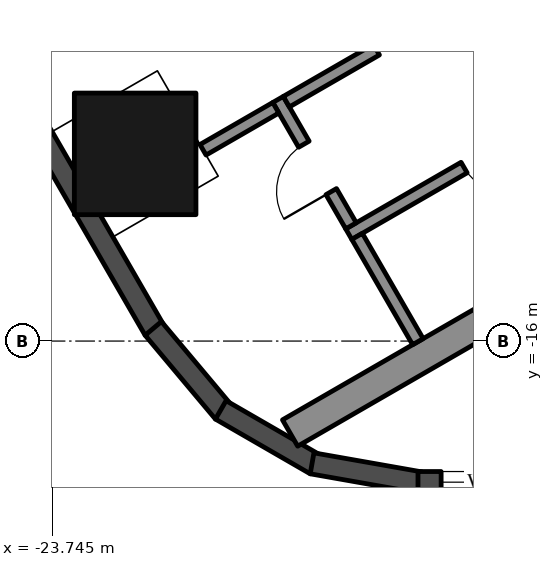
"""IFC4 building model, lengths in metres.
Left out: names, types, materials, properties, quantities, classifications, styles, units other than length and angle.
Written with IfcOpenShell. Run it as: python <this file> out.ifc"""

import sys

from ifc_helpers import new_model, si_unit, direction, frame, frame_2d, origin, origin_2d, place, context, subcontext, project, spatial, rectangle, hollow_rectangle, extrude, boolean, halfspace, element, fill, save


model = new_model("IFC4")
c1 = context("Model", 3, precision=1e-05, world=origin(), true_north=direction((0.0, 1.0)))
c2 = subcontext(c1, "Body", "Model", "MODEL_VIEW")
j1 = project(units=[si_unit("LENGTHUNIT", "METRE"), si_unit("PLANEANGLEUNIT", "RADIAN")], contexts=[c1])
p1 = place(None, origin())
s1 = spatial("IfcSite", under=j1, at=p1, CompositionType="ELEMENT")
p2 = place(p1, origin())
s2 = spatial("IfcBuilding", under=s1, at=p2, CompositionType="ELEMENT")
p3 = place(p2, frame((0.0, 0.0, 276.3)))
s3 = spatial("IfcBuildingStorey", under=s2, at=p3, CompositionType="ELEMENT", Elevation=276.3)
p4 = place(p3, frame((-22.38, -12.921, 0.0), z_axis=(0.190406849863, 0.109944185114, 0.975529347424), x_axis=(0.499999219142, -0.866025854536, 1.1512328e-05)))
e1 = element("IfcColumn", 1, at=p4, inside=s3, PredefinedType="COLUMN", context=c2, shape_type="SweptSolid", body=[
    boolean("DIFFERENCE", boolean("DIFFERENCE", extrude(hollow_rectangle(XDim=2.0, YDim=2.0, WallThickness=0.05, at=origin_2d()), origin(), (0.0, 0.0, 1.0), 3.793), halfspace(frame((0.0, 0.0, 0.113), z_axis=(0.0, 0.0, 1.0), x_axis=(1.0, 0.0, 0.0)), True)), halfspace(frame((0.0, 0.0, 3.679), z_axis=(0.0, 0.0, 1.0), x_axis=(1.0, 0.0, 0.0)), False)),
])
p5 = place(p3, frame((-24.731, -11.2, 0.0), z_axis=(0.0, 0.0, 1.0), x_axis=(0.500025039717, -0.866010946615, 0.0)))
e2 = element("IfcWall", 2, at=p5, inside=s3, PredefinedType="SOLIDWALL", context=c2, shape_type="SweptSolid", body=[
    extrude(rectangle(XDim=5.331, YDim=0.35, at=frame_2d((2.666, 0.0))), origin(), (0.0, 0.0, 1.0), 3.55),
])
p6 = place(p3, frame((-22.083, -15.792, 0.0), z_axis=(0.0, 0.0, 1.0), x_axis=(0.642756114672, -0.766070869471, 0.0)))
e3 = element("IfcWall", 3, at=p6, inside=s3, PredefinedType="SOLIDWALL", context=c2, shape_type="SweptSolid", body=[
    extrude(rectangle(XDim=1.8, YDim=0.35, at=frame_2d((0.9, 0.0))), origin(), (0.0, 0.0, 1.0), 3.55),
])
p7 = place(p3, frame((-20.972, -17.132, 0.0), z_axis=(0.0, 0.0, 1.0), x_axis=(0.866047807691, -0.499961193289, 0.0)))
e4 = element("IfcWall", 4, at=p7, inside=s3, PredefinedType="SOLIDWALL", context=c2, shape_type="SweptSolid", body=[
    extrude(rectangle(XDim=1.8, YDim=0.35, at=frame_2d((0.9, 0.0))), origin(), (0.0, 0.0, 1.0), 3.55),
])
p8 = place(p3, frame((-19.471, -18.011, 0.0), z_axis=(0.0, 0.0, 1.0), x_axis=(0.984810858511, -0.173630564586, 0.0)))
e5 = element("IfcWall", 5, at=p8, inside=s3, PredefinedType="SOLIDWALL", context=c2, shape_type="SweptSolid", body=[
    extrude(rectangle(XDim=1.8, YDim=0.35, at=frame_2d((0.9, 0.0))), origin(), (0.0, 0.0, 1.0), 3.55),
])
p9 = place(p3, frame((-17.729, -18.321, 0.0), z_axis=(0.0, 0.0, 1.0), x_axis=(1.0, 0.0, 0.0)))
e6 = element("IfcWall", 6, at=p9, inside=s3, PredefinedType="SOLIDWALL", context=c2, shape_type="SweptSolid", body=[
    extrude(rectangle(XDim=11.185, YDim=0.35, at=frame_2d((5.593, 0.0))), origin(), (0.0, 0.0, 1.0), 3.55),
])
p10 = place(p9, frame((0.381, 0.0, 0.3)))
e7 = element("IfcOpeningElement", 7, at=p10, cuts=e6, PredefinedType="OPENING", context=c2, shape_type="SweptSolid", body=[
    extrude(rectangle(XDim=1.7, YDim=2.65, at=frame_2d((0.85, 1.325))), frame((0.0, 0.185, 0.0), z_axis=(0.0, -1.0, 0.0), x_axis=(1.0, 0.0, 0.0)), (0.0, 0.0, 1.0), 0.37),
])
p11 = place(p9, frame((7.205, 0.0, 0.0)))
e8 = element("IfcOpeningElement", 8, at=p11, cuts=e6, PredefinedType="OPENING", context=c2, shape_type="SweptSolid", body=[
    extrude(rectangle(XDim=2.4, YDim=2.4, at=frame_2d((1.2, 1.2))), frame((0.0, 0.185, 0.0), z_axis=(0.0, -1.0, 0.0), x_axis=(1.0, 0.0, 0.0)), (0.0, 0.0, 1.0), 0.37),
])
p12 = place(p9, frame((3.979, 0.0, 0.3)))
e9 = element("IfcOpeningElement", 9, at=p12, cuts=e6, PredefinedType="OPENING", context=c2, shape_type="SweptSolid", body=[
    extrude(rectangle(XDim=2.9, YDim=2.65, at=frame_2d((1.45, 1.325))), frame((0.0, 0.185, 0.0), z_axis=(0.0, -1.0, 0.0), x_axis=(1.0, 0.0, 0.0)), (0.0, 0.0, 1.0), 0.37),
])
p13 = place(p3, frame((-8.547, -10.997, 0.0), z_axis=(0.0, 0.0, 1.0), x_axis=(-0.866030218785, -0.499991660082, 0.0)))
e10 = element("IfcWall", 10, at=p13, inside=s3, PredefinedType="SHEAR", context=c2, shape_type="SweptSolid", body=[
    extrude(rectangle(XDim=13.031, YDim=0.5, at=frame_2d((6.516, 0.0))), origin(), (0.0, 0.0, 1.0), 3.5),
])
p14 = place(p3, frame((-10.068, -9.162, 0.0), z_axis=(0.0, 0.0, 1.0), x_axis=(-0.866032725843, -0.499987317609, 0.0)))
e11 = element("IfcWall", 11, at=p14, inside=s3, PredefinedType="SHEAR", context=c2, shape_type="SweptSolid", body=[
    extrude(rectangle(XDim=10.16, YDim=0.2, at=frame_2d((5.08, 0.0))), origin(), (0.0, 0.0, 1.0), 3.5),
])
p15 = place(p14, frame((1.99, 0.0, 0.0)))
e12 = element("IfcOpeningElement", 12, at=p15, cuts=e11, PredefinedType="OPENING", context=c2, shape_type="SweptSolid", body=[
    extrude(rectangle(XDim=0.9, YDim=2.1, at=frame_2d((0.45, 1.05))), frame((0.0, 0.11, 0.0), z_axis=(0.0, -1.0, 0.0), x_axis=(1.0, 0.0, 0.0)), (0.0, 0.0, 1.0), 0.22),
])
p16 = place(p14, frame((7.07, 0.0, 0.0)))
e13 = element("IfcOpeningElement", 13, at=p16, cuts=e11, PredefinedType="OPENING", context=c2, shape_type="SweptSolid", body=[
    extrude(rectangle(XDim=0.9, YDim=2.1, at=frame_2d((0.45, 1.05))), frame((0.0, 0.11, 0.0), z_axis=(0.0, -1.0, 0.0), x_axis=(1.0, 0.0, 0.0)), (0.0, 0.0, 1.0), 0.22),
])
p17 = place(p3, frame((-20.031, -12.026, 0.0), z_axis=(0.0, 0.0, 1.0), x_axis=(0.500033551112, -0.866006032174, 0.0)))
e14 = element("IfcWall", 14, at=p17, inside=s3, PredefinedType="SHEAR", context=c2, shape_type="SweptSolid", body=[
    extrude(rectangle(XDim=2.4, YDim=0.2, at=frame_2d((1.2, 0.0))), origin(), (0.0, 0.0, 1.0), 3.5),
])
p18 = place(p17, frame((0.85, 0.0, 0.0)))
e15 = element("IfcOpeningElement", 15, at=p18, cuts=e14, PredefinedType="OPENING", context=c2, shape_type="SweptSolid", body=[
    extrude(rectangle(XDim=0.9, YDim=2.1, at=frame_2d((0.45, 1.05))), frame((0.0, 0.11, 0.0), z_axis=(0.0, -1.0, 0.0), x_axis=(1.0, 0.0, 0.0)), (0.0, 0.0, 1.0), 0.22),
])
p19 = place(p3, frame((-18.413, -11.208, 0.0), z_axis=(0.0, 0.0, 1.0), x_axis=(-0.866038183914, -0.499977863513, 0.0)))
e16 = element("IfcWall", 16, at=p19, inside=s3, PredefinedType="SHEAR", context=c2, shape_type="SweptSolid", body=[
    extrude(rectangle(XDim=1.71, YDim=0.2, at=frame_2d((0.855, 0.0))), origin(), (0.0, 0.0, 1.0), 3.5),
])
p20 = place(p3, frame((-18.73, -14.278, 0.0), z_axis=(0.0, 0.0, 1.0), x_axis=(0.50002537861, -0.866010750942, 0.0)))
e17 = element("IfcWall", 17, at=p20, inside=s3, PredefinedType="SHEAR", context=c2, shape_type="SweptSolid", body=[
    extrude(rectangle(XDim=2.0, YDim=0.2, at=frame_2d((1.0, 0.0))), origin(), (0.0, 0.0, 1.0), 3.5),
])
p21 = place(p3, frame((-20.067, -12.163, 0.0), z_axis=(0.0, 0.0, 1.0), x_axis=(-0.866094443108, -0.499880401313, 0.0)))
e18 = element("IfcWall", 18, at=p21, inside=s3, PredefinedType="SHEAR", context=c2, shape_type="SweptSolid", body=[
    extrude(rectangle(XDim=1.383, YDim=0.2, at=frame_2d((0.691, 0.0))), origin(), (0.0, 0.0, 1.0), 3.5),
])
p22 = place(p10, origin())
e19 = element("IfcWindow", 19, at=p22, inside=s3, PartitioningType="SINGLE_PANEL", PredefinedType="WINDOW", context=c2, shape_type="SweptSolid", body=[
    extrude(rectangle(XDim=1.7, YDim=2.65, at=frame_2d((0.85, 1.325))), frame((0.0, 0.03, 0.0), z_axis=(0.0, -1.0, 0.0), x_axis=(1.0, 0.0, 0.0)), (0.0, 0.0, 1.0), 0.06),
])
fill(e7, e19)
p23 = place(p16, origin())
e20 = element("IfcDoor", 20, at=p23, inside=s3, OperationType="SINGLE_SWING_LEFT", PredefinedType="DOOR", context=c2, shape_type="SweptSolid", body=[
    extrude(rectangle(XDim=0.9, YDim=2.1, at=frame_2d((0.45, 1.05))), frame((0.0, 0.025, 0.0), z_axis=(0.0, -1.0, 0.0), x_axis=(1.0, 0.0, 0.0)), (0.0, 0.0, 1.0), 0.05),
])
fill(e13, e20)
p24 = place(p18, frame((0.9, 0.0, 0.0), z_axis=(0.0, 0.0, 1.0), x_axis=(-1.0, 0.0, 0.0)))
e21 = element("IfcDoor", 21, at=p24, inside=s3, OperationType="SINGLE_SWING_LEFT", PredefinedType="DOOR", context=c2, shape_type="SweptSolid", body=[
    extrude(rectangle(XDim=0.9, YDim=2.1, at=frame_2d((0.45, 1.05))), frame((0.0, 0.025, 0.0), z_axis=(0.0, -1.0, 0.0), x_axis=(1.0, 0.0, 0.0)), (0.0, 0.0, 1.0), 0.05),
])
fill(e15, e21)
save(model, sys.argv[1])
